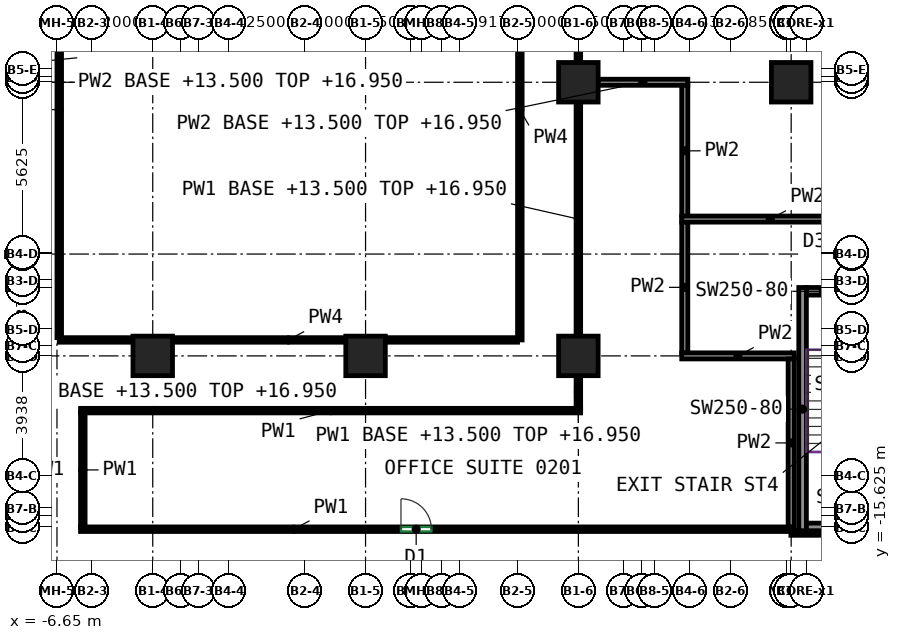
"""IFC4 building model, lengths in metres.
Left out: names, types, materials, properties, quantities, classifications, styles, units other than length and angle.
Written with IfcOpenShell. Run it as: python <this file> out.ifc"""

import sys

from ifc_helpers import new_model, si_unit, direction, frame, frame_2d, origin, origin_2d, place, context, subcontext, project, spatial, rectangle, extrude, source, transform, mapped, element, fill, save


model = new_model("IFC4")
c1 = context("Model", 3, precision=1e-05, world=origin(), true_north=direction((0.0, 1.0)))
c2 = subcontext(c1, "Body", "Model", "MODEL_VIEW")
j1 = project(units=[si_unit("LENGTHUNIT", "METRE"), si_unit("PLANEANGLEUNIT", "RADIAN")], contexts=[c1])
p1 = place(None, origin())
s1 = spatial("IfcSite", under=j1, at=p1, CompositionType="ELEMENT")
p2 = place(p1, origin())
s2 = spatial("IfcBuilding", under=s1, at=p2, CompositionType="ELEMENT")
p3 = place(p2, frame((0.0, 0.0, 13.5)))
s3 = spatial("IfcBuildingStorey", under=s2, at=p3, CompositionType="ELEMENT", Elevation=13.5)
m1 = source(origin(), c2, "Body", "SweptSolid", [
    extrude(rectangle(XDim=1.3, YDim=1.3, at=origin_2d()), origin(), (0.0, 0.0, 1.0), 4.1),
])
for number, where, z_axis, x_axis in (
    (1, (-3.5, -10.0, 0.0), (0.0, 0.0, 1.0), (1.0, 0.0, 0.0)),
    (2, (3.5, -10.0, 0.0), (0.0, 0.0, 1.0), (1.0, 0.0, 0.0)),
    (3, (10.5, -10.0, 0.0), (0.0, 0.0, 1.0), (1.0, 0.0, 0.0)),
    (4, (10.5, -1.0, 0.0), (0.0, 0.0, 1.0), (1.0, 0.0, 0.0)),
    (5, (17.5, -1.0, 0.0), (0.0, 0.0, 1.0), (1.0, 0.0, 0.0)),
):
    element("IfcColumn", number, at=place(p3, frame(where, z_axis=z_axis, x_axis=x_axis)), inside=s3, PredefinedType="COLUMN", context=c2, shape_type="MappedRepresentation", body=[
        mapped(m1, transform((0.0, 0.0, 0.0))),
    ])
m2 = source(origin(), c2, "Body", "SweptSolid", [
    extrude(rectangle(XDim=8.0, YDim=0.25, at=frame_2d((4.0, 0.0))), origin(), (0.0, 0.0, 1.0), 4.1),
])
p4 = place(p3, frame((17.875, -15.75, 0.0), z_axis=(0.0, 0.0, 1.0), x_axis=(0.0, 1.0, 0.0)))
e6 = element("IfcWall", 6, at=p4, inside=s3, PredefinedType="SHEAR", context=c2, shape_type="MappedRepresentation", body=[
    mapped(m2, transform((0.0, 0.0, 0.0))),
])
m3 = source(origin(), c2, "Body", "SweptSolid", [
    extrude(rectangle(XDim=3.7, YDim=0.25, at=frame_2d((1.85, 0.0))), origin(), (0.0, 0.0, 1.0), 4.1),
])
p5 = place(p3, frame((18.0, -15.625, 0.0), z_axis=(0.0, 0.0, 1.0), x_axis=(1.0, 0.0, 0.0)))
e7 = element("IfcWall", 7, at=p5, inside=s3, PredefinedType="SHEAR", context=c2, shape_type="MappedRepresentation", body=[
    mapped(m3, transform((0.0, 0.0, 0.0))),
])
p6 = place(p3, frame((18.0, -7.875, 0.0), z_axis=(0.0, 0.0, 1.0), x_axis=(1.0, 0.0, 0.0)))
e8 = element("IfcWall", 8, at=p6, inside=s3, PredefinedType="SHEAR", context=c2, shape_type="MappedRepresentation", body=[
    mapped(m3, transform((0.0, 0.0, 0.0))),
])
p7 = place(p6, frame((1.25, 0.0, 0.0)))
e9 = element("IfcOpeningElement", 9, at=p7, cuts=e8, PredefinedType="OPENING", context=c2, shape_type="SweptSolid", body=[
    extrude(rectangle(XDim=1.2, YDim=2.1, at=frame_2d((0.6, 1.05))), frame((0.0, 0.135, 0.0), z_axis=(0.0, -1.0, 0.0), x_axis=(1.0, 0.0, 0.0)), (0.0, 0.0, 1.0), 0.27),
])
p8 = place(p3, frame((10.5, -9.35, 0.0), z_axis=(0.0, 0.0, 1.0), x_axis=(0.0, 1.0, 0.0)))
e10 = element("IfcWall", 10, at=p8, inside=s3, PredefinedType="PARTITIONING", context=c2, shape_type="SweptSolid", body=[
    extrude(rectangle(XDim=7.7, YDim=0.15, at=frame_2d((3.85, 0.0))), origin(), (0.0, 0.0, 1.0), 3.45),
])
p9 = place(p3, frame((10.5, -11.725, 0.0), z_axis=(0.0, 0.0, 1.0), x_axis=(0.0, 1.0, 0.0)))
e11 = element("IfcWall", 11, at=p9, inside=s3, PredefinedType="PARTITIONING", context=c2, shape_type="SweptSolid", body=[
    extrude(rectangle(XDim=1.075, YDim=0.15, at=frame_2d((0.538, 0.0))), origin(), (0.0, 0.0, 1.0), 3.45),
])
p10 = place(p3, frame((-5.875, -11.8, 0.0), z_axis=(0.0, 0.0, 1.0), x_axis=(1.0, 0.0, 0.0)))
e12 = element("IfcWall", 12, at=p10, inside=s3, PredefinedType="PARTITIONING", context=c2, shape_type="SweptSolid", body=[
    extrude(rectangle(XDim=16.45, YDim=0.15, at=frame_2d((8.225, 0.0))), origin(), (0.0, 0.0, 1.0), 4.1),
])
p11 = place(p3, frame((-5.8, -15.625, 0.0), z_axis=(0.0, 0.0, 1.0), x_axis=(0.0, 1.0, 0.0)))
e13 = element("IfcWall", 13, at=p11, inside=s3, PredefinedType="PARTITIONING", context=c2, shape_type="SweptSolid", body=[
    extrude(rectangle(XDim=3.75, YDim=0.15, at=frame_2d((1.875, 0.0))), origin(), (0.0, 0.0, 1.0), 4.1),
])
p12 = place(p3, frame((-5.875, -15.7, 0.0), z_axis=(0.0, 0.0, 1.0), x_axis=(1.0, 0.0, 0.0)))
e14 = element("IfcWall", 14, at=p12, inside=s3, PredefinedType="PARTITIONING", context=c2, shape_type="SweptSolid", body=[
    extrude(rectangle(XDim=23.385, YDim=0.15, at=frame_2d((11.692, 0.0))), origin(), (0.0, 0.0, 1.0), 4.1),
])
p13 = place(p12, frame((10.54, 0.0, 0.0)))
e15 = element("IfcOpeningElement", 15, at=p13, cuts=e14, PredefinedType="OPENING", context=c2, shape_type="SweptSolid", body=[
    extrude(rectangle(XDim=1.0, YDim=2.1, at=frame_2d((0.5, 1.05))), frame((0.0, 0.085, 0.0), z_axis=(0.0, -1.0, 0.0), x_axis=(1.0, 0.0, 0.0)), (0.0, 0.0, 1.0), 0.17),
])
p14 = place(p3, frame((10.5, -0.35, 0.0), z_axis=(0.0, 0.0, 1.0), x_axis=(0.0, 1.0, 0.0)))
e16 = element("IfcWall", 16, at=p14, inside=s3, PredefinedType="PARTITIONING", context=c2, shape_type="SweptSolid", body=[
    extrude(rectangle(XDim=3.775, YDim=0.15, at=frame_2d((1.888, 0.0))), origin(), (0.0, 0.0, 1.0), 4.1),
])
p15 = place(p3, frame((17.49, -15.825, 0.0), z_axis=(0.0, 0.0, 1.0), x_axis=(1.0, 0.0, 0.0)))
e17 = element("IfcWall", 17, at=p15, inside=s3, PredefinedType="PARTITIONING", context=c2, shape_type="SweptSolid", body=[
    extrude(rectangle(XDim=2.31, YDim=0.15, at=frame_2d((1.155, 0.0))), origin(), (0.0, 0.0, 1.0), 4.1),
])
p16 = place(p3, frame((11.15, -1.0, 0.0), z_axis=(0.0, 0.0, 1.0), x_axis=(1.0, 0.0, 0.0)))
e18 = element("IfcWall", 18, at=p16, inside=s3, PredefinedType="PARTITIONING", context=c2, shape_type="SweptSolid", body=[
    extrude(rectangle(XDim=2.95, YDim=0.2, at=frame_2d((1.475, 0.0))), origin(), (0.0, 0.0, 1.0), 3.45),
])
for number, where, z_axis, x_axis in (
    (19, (14.0, -5.41, 0.0), (0.0, 0.0, 1.0), (0.0, 1.0, 0.0)),
    (20, (14.0, -9.9, 0.0), (0.0, 0.0, 1.0), (0.0, 1.0, 0.0)),
):
    element("IfcWall", number, at=place(p3, frame(where, z_axis=z_axis, x_axis=x_axis)), inside=s3, PredefinedType="PARTITIONING", context=c2, shape_type="SweptSolid", body=[
        extrude(rectangle(XDim=4.31, YDim=0.2, at=frame_2d((2.155, 0.0))), origin(), (0.0, 0.0, 1.0), 4.1),
    ])
p17 = place(p3, frame((13.9, -10.0, 0.0), z_axis=(0.0, 0.0, 1.0), x_axis=(1.0, 0.0, 0.0)))
e21 = element("IfcWall", 21, at=p17, inside=s3, PredefinedType="PARTITIONING", context=c2, shape_type="SweptSolid", body=[
    extrude(rectangle(XDim=3.7, YDim=0.2, at=frame_2d((1.85, 0.0))), origin(), (0.0, 0.0, 1.0), 4.1),
])
p18 = place(p3, frame((17.5, -15.624, 0.0), z_axis=(0.0, 0.0, 1.0), x_axis=(0.0, 1.0, 0.0)))
e22 = element("IfcWall", 22, at=p18, inside=s3, PredefinedType="PARTITIONING", context=c2, shape_type="SweptSolid", body=[
    extrude(rectangle(XDim=5.524, YDim=0.2, at=frame_2d((2.762, 0.0))), origin(), (0.0, 0.0, 1.0), 4.1),
])
p19 = place(p3, frame((13.9, -5.5, 0.0), z_axis=(0.0, 0.0, 1.0), x_axis=(1.0, 0.0, 0.0)))
e23 = element("IfcWall", 23, at=p19, inside=s3, PredefinedType="PARTITIONING", context=c2, shape_type="SweptSolid", body=[
    extrude(rectangle(XDim=5.825, YDim=0.2, at=frame_2d((2.913, 0.0))), origin(), (0.0, 0.0, 1.0), 4.1),
])
p20 = place(p3, frame((8.5, -9.475, 0.0), z_axis=(0.0, 0.0, 1.0), x_axis=(-1.0, 0.0, 0.0)))
e24 = element("IfcWall", 24, at=p20, inside=s3, PredefinedType="PARTITIONING", context=c2, shape_type="SweptSolid", body=[
    extrude(rectangle(XDim=15.075, YDim=0.15, at=frame_2d((7.538, 0.0))), origin(), (0.0, 0.0, 1.0), 4.1),
])
p21 = place(p3, frame((-6.575, -9.4, 0.0), z_axis=(0.0, 0.0, 1.0), x_axis=(0.0, 1.0, 0.0)))
e25 = element("IfcWall", 25, at=p21, inside=s3, PredefinedType="PARTITIONING", context=c2, shape_type="SweptSolid", body=[
    extrude(rectangle(XDim=15.0, YDim=0.15, at=frame_2d((7.5, 0.0))), origin(), (0.0, 0.0, 1.0), 4.1),
])
p22 = place(p3, frame((8.575, 5.675, 0.0), z_axis=(0.0, 0.0, 1.0), x_axis=(0.0, -1.0, 0.0)))
e26 = element("IfcWall", 26, at=p22, inside=s3, PredefinedType="PARTITIONING", context=c2, shape_type="SweptSolid", body=[
    extrude(rectangle(XDim=15.15, YDim=0.15, at=frame_2d((7.575, 0.0))), origin(), (0.0, 0.0, 1.0), 4.1),
])
p23 = place(p13, origin())
e27 = element("IfcDoor", 27, at=p23, inside=s3, OperationType="SINGLE_SWING_LEFT", PredefinedType="DOOR", context=c2, shape_type="SweptSolid", body=[
    extrude(rectangle(XDim=1.0, YDim=2.1, at=frame_2d((0.5, 1.05))), frame((0.0, 0.025, 0.0), z_axis=(0.0, -1.0, 0.0), x_axis=(1.0, 0.0, 0.0)), (0.0, 0.0, 1.0), 0.05),
])
fill(e15, e27)
save(model, sys.argv[1])
